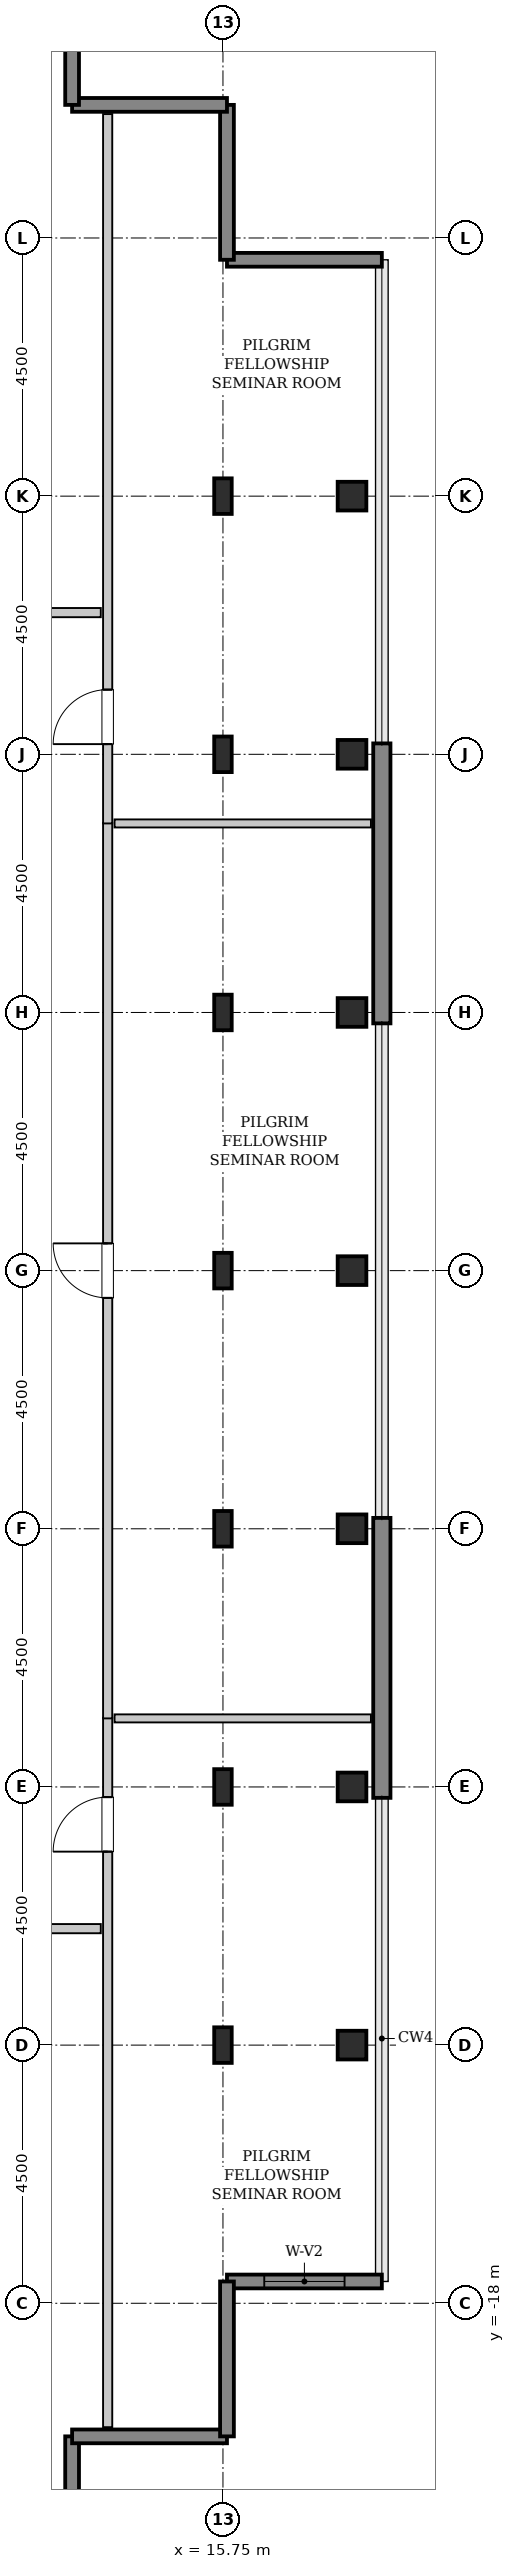
"""IFC4 building model, lengths in metres.
Left out: names, types, materials, properties, quantities, classifications, styles, units other than length and angle.
Written with IfcOpenShell. Run it as: python <this file> out.ifc"""

import sys

from ifc_helpers import new_model, si_unit, direction, frame, frame_2d, origin, origin_2d, place, context, subcontext, project, spatial, rectangle, hollow_rectangle, i_section, extrude, source, transform, mapped, element, fill, save


model = new_model("IFC4")
c1 = context("Model", 3, precision=1e-05, world=origin(), true_north=direction((0.0, 1.0)))
c2 = subcontext(c1, "Body", "Model", "MODEL_VIEW")
j1 = project(units=[si_unit("LENGTHUNIT", "METRE"), si_unit("PLANEANGLEUNIT", "RADIAN")], contexts=[c1])
p1 = place(None, origin())
s1 = spatial("IfcSite", under=j1, at=p1, CompositionType="ELEMENT")
p2 = place(p1, origin())
s2 = spatial("IfcBuilding", under=s1, at=p2, CompositionType="ELEMENT")
p3 = place(p2, frame((0.0, 0.0, 322.4)))
s3 = spatial("IfcBuildingStorey", under=s2, at=p3, CompositionType="ELEMENT", Elevation=322.4)
m1 = source(origin(), c2, "Body", "SweptSolid", [
    extrude(i_section(OverallWidth=0.305, OverallDepth=0.62, WebThickness=0.021, FlangeThickness=0.04, FilletRadius=0.027, at=origin_2d()), origin(), (0.0, 0.0, 1.0), 3.8),
])
for number, where, z_axis, x_axis in (
    (1, (15.75, -13.5, 0.0), (0.0, 0.0, 1.0), (1.0, 0.0, 0.0)),
    (2, (15.75, -9.0, 0.0), (0.0, 0.0, 1.0), (1.0, 0.0, 0.0)),
    (3, (15.75, -4.5, 0.0), (0.0, 0.0, 1.0), (1.0, 0.0, 0.0)),
    (4, (15.75, 0.0, 0.0), (0.0, 0.0, 1.0), (1.0, 0.0, 0.0)),
    (5, (15.75, 4.5, 0.0), (0.0, 0.0, 1.0), (1.0, 0.0, 0.0)),
    (6, (15.75, 9.0, 0.0), (0.0, 0.0, 1.0), (1.0, 0.0, 0.0)),
    (7, (15.75, 13.5, 0.0), (0.0, 0.0, 1.0), (1.0, 0.0, 0.0)),
):
    element("IfcColumn", number, at=place(p3, frame(where, z_axis=z_axis, x_axis=x_axis)), inside=s3, PredefinedType="COLUMN", context=c2, shape_type="MappedRepresentation", body=[
        mapped(m1, transform((0.0, 0.0, 0.0), x_axis=(1.0, 0.0, 0.0), y_axis=(0.0, 1.0, 0.0), z_axis=(0.0, 0.0, 1.0), scale=1.0)),
    ])
m2 = source(origin(), c2, "Body", "SweptSolid", [
    extrude(hollow_rectangle(XDim=0.5, YDim=0.5, WallThickness=0.025, InnerFilletRadius=0.025, OuterFilletRadius=0.05, at=origin_2d()), origin(), (0.0, 0.0, 1.0), 3.8),
])
for number, where, z_axis, x_axis in (
    (8, (18.0, -13.5, 0.0), (0.0, 0.0, 1.0), (1.0, 0.0, 0.0)),
    (9, (18.0, -9.0, 0.0), (0.0, 0.0, 1.0), (1.0, 0.0, 0.0)),
    (10, (18.0, -4.5, 0.0), (0.0, 0.0, 1.0), (1.0, 0.0, 0.0)),
    (11, (18.0, 0.0, 0.0), (0.0, 0.0, 1.0), (1.0, 0.0, 0.0)),
    (12, (18.0, 4.5, 0.0), (0.0, 0.0, 1.0), (1.0, 0.0, 0.0)),
    (13, (18.0, 9.0, 0.0), (0.0, 0.0, 1.0), (1.0, 0.0, 0.0)),
    (14, (18.0, 13.5, 0.0), (0.0, 0.0, 1.0), (1.0, 0.0, 0.0)),
):
    element("IfcColumn", number, at=place(p3, frame(where, z_axis=z_axis, x_axis=x_axis)), inside=s3, PredefinedType="COLUMN", context=c2, shape_type="MappedRepresentation", body=[
        mapped(m2, transform((0.0, 0.0, 0.0), x_axis=(1.0, 0.0, 0.0), y_axis=(0.0, 1.0, 0.0), z_axis=(0.0, 0.0, 1.0), scale=1.0)),
    ])
m3 = source(origin(), c2, "Body", "SweptSolid", [
    extrude(rectangle(XDim=4.88, YDim=0.3, at=frame_2d((2.44, 0.0))), origin(), (0.0, 0.0, 1.0), 3.55),
])
for number, where, z_axis, x_axis in (
    (15, (18.52, -9.19, 0.0), (0.0, 0.0, 1.0), (0.0, 1.0, 0.0)),
    (16, (18.52, 4.31, 0.0), (0.0, 0.0, 1.0), (0.0, 1.0, 0.0)),
):
    element("IfcWall", number, at=place(p3, frame(where, z_axis=z_axis, x_axis=x_axis)), inside=s3, PredefinedType="SHEAR", context=c2, shape_type="MappedRepresentation", body=[
        mapped(m3, transform((0.0, 0.0, 0.0), x_axis=(1.0, 0.0, 0.0), y_axis=(0.0, 1.0, 0.0), z_axis=(0.0, 0.0, 1.0), scale=1.0)),
    ])
m4 = source(origin(), c2, "Body", "SweptSolid", [
    extrude(rectangle(XDim=2.7, YDim=0.24, at=frame_2d((1.35, 0.0))), origin(), (0.0, 0.0, 1.0), 3.55),
])
p4 = place(p3, frame((15.82, -17.62, 0.0), z_axis=(0.0, 0.0, 1.0), x_axis=(1.0, 0.0, 0.0)))
e17 = element("IfcWall", 17, at=p4, inside=s3, PredefinedType="SHEAR", context=c2, shape_type="MappedRepresentation", body=[
    mapped(m4, transform((0.0, 0.0, 0.0), x_axis=(1.0, 0.0, 0.0), y_axis=(0.0, 1.0, 0.0), z_axis=(0.0, 0.0, 1.0), scale=1.0)),
])
p5 = place(p4, frame((0.65, 0.0, 0.85)))
e18 = element("IfcOpeningElement", 18, at=p5, cuts=e17, PredefinedType="OPENING", context=c2, shape_type="SweptSolid", body=[
    extrude(rectangle(XDim=1.4, YDim=1.8, at=frame_2d((0.7, 0.9))), frame((0.0, 0.13, 0.0), z_axis=(0.0, -1.0, 0.0), x_axis=(1.0, 0.0, 0.0)), (0.0, 0.0, 1.0), 0.26),
])
for number, where, z_axis, x_axis in (
    (19, (18.52, 17.62, 0.0), (0.0, 0.0, 1.0), (-1.0, 0.0, 0.0)),
    (20, (15.82, 17.62, 0.0), (0.0, 0.0, 1.0), (0.0, 1.0, 0.0)),
    (21, (15.82, 20.32, 0.0), (0.0, 0.0, 1.0), (-1.0, 0.0, 0.0)),
    (22, (13.12, 20.32, 0.0), (0.0, 0.0, 1.0), (0.0, 1.0, 0.0)),
    (23, (13.12, -23.02, 0.0), (0.0, 0.0, 1.0), (0.0, 1.0, 0.0)),
    (24, (13.12, -20.32, 0.0), (0.0, 0.0, 1.0), (1.0, 0.0, 0.0)),
    (25, (15.82, -20.32, 0.0), (0.0, 0.0, 1.0), (0.0, 1.0, 0.0)),
):
    element("IfcWall", number, at=place(p3, frame(where, z_axis=z_axis, x_axis=x_axis)), inside=s3, PredefinedType="SHEAR", context=c2, shape_type="MappedRepresentation", body=[
        mapped(m4, transform((0.0, 0.0, 0.0), x_axis=(1.0, 0.0, 0.0), y_axis=(0.0, 1.0, 0.0), z_axis=(0.0, 0.0, 1.0), scale=1.0)),
    ])
m5 = source(origin(), c2, "Body", "SweptSolid", [
    extrude(rectangle(XDim=12.365, YDim=0.16, at=frame_2d((6.183, 0.0))), origin(), (0.0, 0.0, 1.0), 3.535),
])
p6 = place(p3, frame((13.74, -20.16, 0.0), z_axis=(0.0, 0.0, 1.0), x_axis=(0.0, 1.0, 0.0)))
e26 = element("IfcWall", 26, at=p6, inside=s3, PredefinedType="PARTITIONING", context=c2, shape_type="MappedRepresentation", body=[
    mapped(m5, transform((0.0, 0.0, 0.0), x_axis=(1.0, 0.0, 0.0), y_axis=(0.0, 1.0, 0.0), z_axis=(0.0, 0.0, 1.0), scale=1.0)),
])
p7 = place(p6, frame((10.032, 0.0, 0.0)))
e27 = element("IfcOpeningElement", 27, at=p7, cuts=e26, PredefinedType="OPENING", context=c2, shape_type="SweptSolid", body=[
    extrude(rectangle(XDim=0.95, YDim=2.1, at=frame_2d((0.475, 1.05))), frame((0.0, 0.09, 0.0), z_axis=(0.0, -1.0, 0.0), x_axis=(1.0, 0.0, 0.0)), (0.0, 0.0, 1.0), 0.18),
])
m6 = source(origin(), c2, "Body", "SweptSolid", [
    extrude(rectangle(XDim=4.47, YDim=0.14, at=frame_2d((2.235, 0.0))), origin(), (0.0, 0.0, 1.0), 3.535),
])
p8 = place(p3, frame((13.86, -7.805, 0.0), z_axis=(0.0, 0.0, 1.0), x_axis=(1.0, 0.0, 0.0)))
e28 = element("IfcWall", 28, at=p8, inside=s3, PredefinedType="PARTITIONING", context=c2, shape_type="MappedRepresentation", body=[
    mapped(m6, transform((0.0, 0.0, 0.0), x_axis=(1.0, 0.0, 0.0), y_axis=(0.0, 1.0, 0.0), z_axis=(0.0, 0.0, 1.0), scale=1.0)),
])
m7 = source(origin(), c2, "Body", "SweptSolid", [
    extrude(rectangle(XDim=15.61, YDim=0.16, at=frame_2d((7.805, 0.0))), origin(), (0.0, 0.0, 1.0), 3.535),
])
p9 = place(p3, frame((13.74, -7.805, 0.0), z_axis=(0.0, 0.0, 1.0), x_axis=(0.0, 1.0, 0.0)))
e29 = element("IfcWall", 29, at=p9, inside=s3, PredefinedType="PARTITIONING", context=c2, shape_type="MappedRepresentation", body=[
    mapped(m7, transform((0.0, 0.0, 0.0), x_axis=(1.0, 0.0, 0.0), y_axis=(0.0, 1.0, 0.0), z_axis=(0.0, 0.0, 1.0), scale=1.0)),
])
p10 = place(p9, frame((7.33, 0.0, 0.0)))
e30 = element("IfcOpeningElement", 30, at=p10, cuts=e29, PredefinedType="OPENING", context=c2, shape_type="SweptSolid", body=[
    extrude(rectangle(XDim=0.95, YDim=2.1, at=frame_2d((0.475, 1.05))), frame((0.0, 0.09, 0.0), z_axis=(0.0, -1.0, 0.0), x_axis=(1.0, 0.0, 0.0)), (0.0, 0.0, 1.0), 0.18),
])
p11 = place(p3, frame((13.86, 7.795, 0.0), z_axis=(0.0, 0.0, 1.0), x_axis=(1.0, 0.0, 0.0)))
e31 = element("IfcWall", 31, at=p11, inside=s3, PredefinedType="PARTITIONING", context=c2, shape_type="MappedRepresentation", body=[
    mapped(m6, transform((0.0, 0.0, 0.0), x_axis=(1.0, 0.0, 0.0), y_axis=(0.0, 1.0, 0.0), z_axis=(0.0, 0.0, 1.0), scale=1.0)),
])
p12 = place(p3, frame((13.74, 7.795, 0.0), z_axis=(0.0, 0.0, 1.0), x_axis=(0.0, 1.0, 0.0)))
e32 = element("IfcWall", 32, at=p12, inside=s3, PredefinedType="PARTITIONING", context=c2, shape_type="MappedRepresentation", body=[
    mapped(m5, transform((0.0, 0.0, 0.0), x_axis=(1.0, 0.0, 0.0), y_axis=(0.0, 1.0, 0.0), z_axis=(0.0, 0.0, 1.0), scale=1.0)),
])
p13 = place(p12, frame((1.383, 0.0, 0.0)))
e33 = element("IfcOpeningElement", 33, at=p13, cuts=e32, PredefinedType="OPENING", context=c2, shape_type="SweptSolid", body=[
    extrude(rectangle(XDim=0.95, YDim=2.1, at=frame_2d((0.475, 1.05))), frame((0.0, 0.09, 0.0), z_axis=(0.0, -1.0, 0.0), x_axis=(1.0, 0.0, 0.0)), (0.0, 0.0, 1.0), 0.18),
])
m8 = source(origin(), c2, "Body", "SweptSolid", [
    extrude(rectangle(XDim=5.86, YDim=0.16, at=frame_2d((2.93, 0.0))), origin(), (0.0, 0.0, 1.0), 3.535),
])
p14 = place(p3, frame((7.76, 11.47, 0.0), z_axis=(0.0, 0.0, 1.0), x_axis=(1.0, 0.0, 0.0)))
e34 = element("IfcWall", 34, at=p14, inside=s3, PredefinedType="PARTITIONING", context=c2, shape_type="MappedRepresentation", body=[
    mapped(m8, transform((0.0, 0.0, 0.0), x_axis=(1.0, 0.0, 0.0), y_axis=(0.0, 1.0, 0.0), z_axis=(0.0, 0.0, 1.0), scale=1.0)),
])
p15 = place(p14, frame((2.455, 0.0, 0.0)))
e35 = element("IfcOpeningElement", 35, at=p15, cuts=e34, PredefinedType="OPENING", context=c2, shape_type="SweptSolid", body=[
    extrude(rectangle(XDim=0.95, YDim=2.1, at=frame_2d((0.475, 1.05))), frame((0.0, 0.09, 0.0), z_axis=(0.0, -1.0, 0.0), x_axis=(1.0, 0.0, 0.0)), (0.0, 0.0, 1.0), 0.18),
])
m9 = source(origin(), c2, "Body", "SweptSolid", [
    extrude(rectangle(XDim=8.36, YDim=0.16, at=frame_2d((4.18, 0.0))), origin(), (0.0, 0.0, 1.0), 3.535),
])
p16 = place(p3, frame((5.26, -11.47, 0.0), z_axis=(0.0, 0.0, 1.0), x_axis=(1.0, 0.0, 0.0)))
e36 = element("IfcWall", 36, at=p16, inside=s3, PredefinedType="PARTITIONING", context=c2, shape_type="MappedRepresentation", body=[
    mapped(m9, transform((0.0, 0.0, 0.0), x_axis=(1.0, 0.0, 0.0), y_axis=(0.0, 1.0, 0.0), z_axis=(0.0, 0.0, 1.0), scale=1.0)),
])
p17 = place(p16, frame((3.705, 0.0, 0.0)))
e37 = element("IfcOpeningElement", 37, at=p17, cuts=e36, PredefinedType="OPENING", context=c2, shape_type="SweptSolid", body=[
    extrude(rectangle(XDim=0.95, YDim=2.1, at=frame_2d((0.475, 1.05))), frame((0.0, 0.09, 0.0), z_axis=(0.0, -1.0, 0.0), x_axis=(1.0, 0.0, 0.0)), (0.0, 0.0, 1.0), 0.18),
])
m10 = source(origin(), c2, "Body", "SweptSolid", [
    extrude(rectangle(XDim=1.4, YDim=1.8, at=frame_2d((0.7, 0.9))), frame((0.0, 0.03, 0.0), z_axis=(0.0, -1.0, 0.0), x_axis=(1.0, 0.0, 0.0)), (0.0, 0.0, 1.0), 0.06),
])
p18 = place(p5, origin())
e38 = element("IfcWindow", 38, at=p18, inside=s3, PartitioningType="SINGLE_PANEL", PredefinedType="WINDOW", context=c2, shape_type="MappedRepresentation", body=[
    mapped(m10, transform((0.0, 0.0, 0.0), x_axis=(1.0, 0.0, 0.0), y_axis=(0.0, 1.0, 0.0), z_axis=(0.0, 0.0, 1.0), scale=1.0)),
])
fill(e18, e38)
m11 = source(origin(), c2, "Body", "SweptSolid", [
    extrude(rectangle(XDim=0.95, YDim=2.1, at=frame_2d((0.475, 1.05))), frame((0.0, 0.025, 0.0), z_axis=(0.0, -1.0, 0.0), x_axis=(1.0, 0.0, 0.0)), (0.0, 0.0, 1.0), 0.05),
])
p19 = place(p7, origin())
e39 = element("IfcDoor", 39, at=p19, inside=s3, OperationType="SINGLE_SWING_LEFT", PredefinedType="DOOR", context=c2, shape_type="MappedRepresentation", body=[
    mapped(m11, transform((0.0, 0.0, 0.0), x_axis=(1.0, 0.0, 0.0), y_axis=(0.0, 1.0, 0.0), z_axis=(0.0, 0.0, 1.0), scale=1.0)),
])
fill(e27, e39)
p20 = place(p10, origin())
e40 = element("IfcDoor", 40, at=p20, inside=s3, OperationType="SINGLE_SWING_RIGHT", PredefinedType="DOOR", context=c2, shape_type="MappedRepresentation", body=[
    mapped(m11, transform((0.0, 0.0, 0.0), x_axis=(1.0, 0.0, 0.0), y_axis=(0.0, 1.0, 0.0), z_axis=(0.0, 0.0, 1.0), scale=1.0)),
])
fill(e30, e40)
p21 = place(p13, origin())
e41 = element("IfcDoor", 41, at=p21, inside=s3, OperationType="SINGLE_SWING_LEFT", PredefinedType="DOOR", context=c2, shape_type="MappedRepresentation", body=[
    mapped(m11, transform((0.0, 0.0, 0.0), x_axis=(1.0, 0.0, 0.0), y_axis=(0.0, 1.0, 0.0), z_axis=(0.0, 0.0, 1.0), scale=1.0)),
])
fill(e33, e41)
save(model, sys.argv[1])
